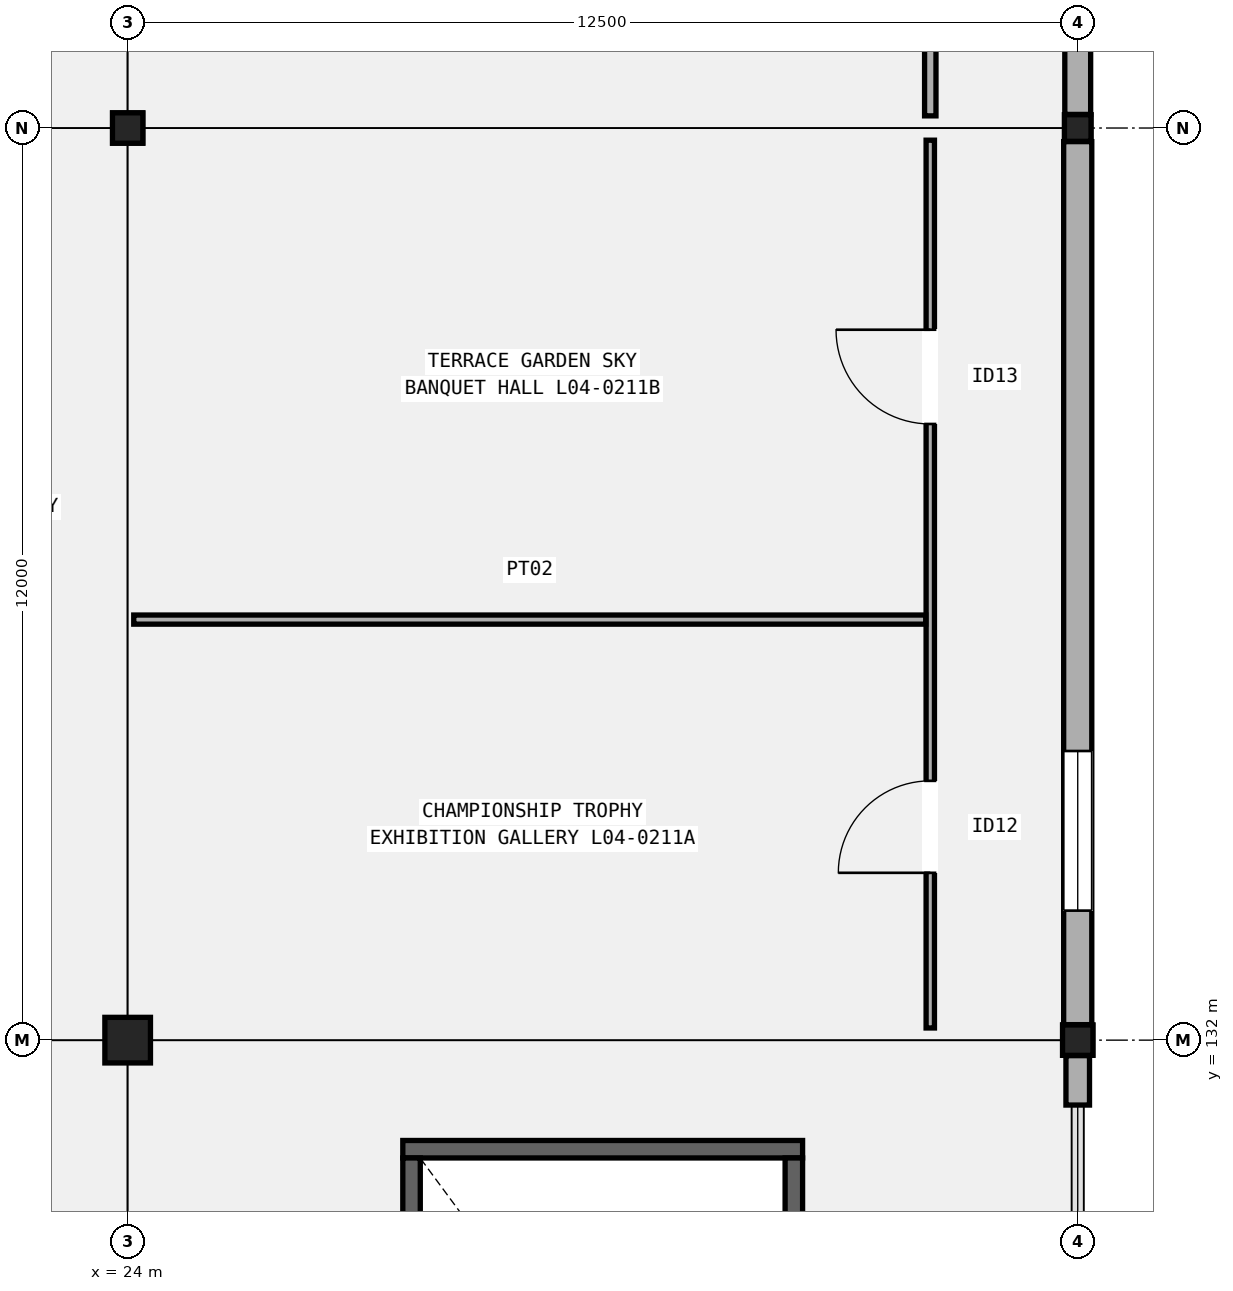
"""IFC4 building model, lengths in metres.
Left out: names, types, materials, properties, quantities, classifications, styles, units other than length and angle.
Written with IfcOpenShell. Run it as: python <this file> out.ifc"""

import sys

from ifc_helpers import new_model, si_unit, direction, frame, frame_2d, origin, origin_2d, place, context, subcontext, project, spatial, rectangle, hollow_rectangle, extrude, element, fill, save


model = new_model("IFC4")
c1 = context("Model", 3, precision=1e-05, world=origin(), true_north=direction((0.0, 1.0)))
c2 = subcontext(c1, "Body", "Model", "MODEL_VIEW")
j1 = project(units=[si_unit("LENGTHUNIT", "METRE"), si_unit("PLANEANGLEUNIT", "RADIAN")], contexts=[c1])
p1 = place(None, origin())
s1 = spatial("IfcSite", under=j1, at=p1, CompositionType="ELEMENT")
p2 = place(p1, origin())
s2 = spatial("IfcBuilding", under=s1, at=p2, CompositionType="ELEMENT")
p3 = place(p2, frame((0.0, 0.0, 20.4)))
s3 = spatial("IfcBuildingStorey", under=s2, at=p3, CompositionType="ELEMENT", Elevation=20.4)
p4 = place(p3, frame((24.0, 132.0, 0.0), z_axis=(0.0, 0.0, 1.0), x_axis=(1.0, 0.0, 0.0)))
e1 = element("IfcColumn", 1, at=p4, inside=s3, PredefinedType="COLUMN", context=c2, shape_type="SweptSolid", body=[
    extrude(rectangle(XDim=0.6, YDim=0.6, at=origin_2d()), origin(), (0.0, 0.0, 1.0), 5.4),
])
for number, where, z_axis, x_axis in (
    (2, (24.0, 144.0, 0.0), (0.0, 0.0, 1.0), (1.0, 0.0, 0.0)),
    (3, (36.5, 132.0, 0.0), (0.0, 0.0, 1.0), (1.0, 0.0, 0.0)),
):
    element("IfcColumn", number, at=place(p3, frame(where, z_axis=z_axis, x_axis=x_axis)), inside=s3, PredefinedType="COLUMN", context=c2, shape_type="SweptSolid", body=[
        extrude(hollow_rectangle(XDim=0.4, YDim=0.4, WallThickness=0.016, InnerFilletRadius=0.016, OuterFilletRadius=0.032, at=origin_2d()), origin(), (0.0, 0.0, 1.0), 5.4),
    ])
p5 = place(p3, frame((36.5, 144.0, 0.0), z_axis=(0.0, 0.0, 1.0), x_axis=(1.0, 0.0, 0.0)))
e4 = element("IfcColumn", 4, at=p5, inside=s3, PredefinedType="COLUMN", context=c2, shape_type="SweptSolid", body=[
    extrude(hollow_rectangle(XDim=0.35, YDim=0.35, WallThickness=0.016, InnerFilletRadius=0.016, OuterFilletRadius=0.032, at=origin_2d()), origin(), (0.0, 0.0, 1.0), 5.4),
])
p6 = place(p3, frame((36.5, 131.146, 0.0), z_axis=(0.0, 0.0, 1.0), x_axis=(0.0, 1.0, 0.0)))
e5 = element("IfcWall", 5, at=p6, inside=s3, PredefinedType="SOLIDWALL", context=c2, shape_type="SweptSolid", body=[
    extrude(rectangle(XDim=0.65, YDim=0.31, at=frame_2d((0.325, 0.0))), origin(), (0.0, 0.0, 1.0), 4.58),
])
p7 = place(p3, frame((36.5, 132.204, 0.0), z_axis=(0.0, 0.0, 1.0), x_axis=(0.0, 1.0, 0.0)))
e6 = element("IfcWall", 6, at=p7, inside=s3, PredefinedType="SOLIDWALL", context=c2, shape_type="SweptSolid", body=[
    extrude(rectangle(XDim=11.617, YDim=0.37, at=frame_2d((5.809, 0.0))), origin(), (0.0, 0.0, 1.0), 4.592),
])
p8 = place(p7, frame((1.5, 0.0, 0.95)))
e7 = element("IfcOpeningElement", 7, at=p8, cuts=e6, PredefinedType="OPENING", context=c2, shape_type="SweptSolid", body=[
    extrude(rectangle(XDim=2.1, YDim=2.25, at=frame_2d((1.05, 1.125))), frame((0.0, 0.195, 0.0), z_axis=(0.0, -1.0, 0.0), x_axis=(1.0, 0.0, 0.0)), (0.0, 0.0, 1.0), 0.39),
])
p9 = place(p3, frame((36.5, 144.179, 0.0), z_axis=(0.0, 0.0, 1.0), x_axis=(0.0, 1.0, 0.0)))
e8 = element("IfcWall", 8, at=p9, inside=s3, PredefinedType="SOLIDWALL", context=c2, shape_type="SweptSolid", body=[
    extrude(rectangle(XDim=11.667, YDim=0.34, at=frame_2d((5.833, 0.0))), origin(), (0.0, 0.0, 1.0), 4.48),
])
p10 = place(p9, frame((1.5, 0.0, 0.95)))
e9 = element("IfcOpeningElement", 9, at=p10, cuts=e8, PredefinedType="OPENING", context=c2, shape_type="SweptSolid", body=[
    extrude(rectangle(XDim=2.1, YDim=2.6, at=frame_2d((1.05, 1.3))), frame((0.0, 0.18, 0.0), z_axis=(0.0, -1.0, 0.0), x_axis=(1.0, 0.0, 0.0)), (0.0, 0.0, 1.0), 0.36),
])
p11 = place(p3, frame((27.62, 130.565, 0.0), z_axis=(0.0, 0.0, 1.0), x_axis=(1.0, 0.0, 0.0)))
e10 = element("IfcWall", 10, at=p11, inside=s3, PredefinedType="SHEAR", context=c2, shape_type="SweptSolid", body=[
    extrude(rectangle(XDim=5.26, YDim=0.23, at=frame_2d((2.63, 0.0))), origin(), (0.0, 0.0, 1.0), 5.18),
])
for number, where, z_axis, x_axis in (
    (11, (27.735, 121.55, 0.0), (0.0, 0.0, 1.0), (0.0, 1.0, 0.0)),
    (12, (32.765, 121.55, 0.0), (0.0, 0.0, 1.0), (0.0, 1.0, 0.0)),
):
    element("IfcWall", number, at=place(p3, frame(where, z_axis=z_axis, x_axis=x_axis)), inside=s3, PredefinedType="SHEAR", context=c2, shape_type="SweptSolid", body=[
        extrude(rectangle(XDim=8.9, YDim=0.23, at=frame_2d((4.45, 0.0))), origin(), (0.0, 0.0, 1.0), 5.18),
    ])
p12 = place(p3, frame((34.56, 132.16, 0.0), z_axis=(0.0, 0.0, 1.0), x_axis=(0.0, 1.0, 0.0)))
e13 = element("IfcWall", 13, at=p12, inside=s3, PredefinedType="PARTITIONING", context=c2, shape_type="SweptSolid", body=[
    extrude(rectangle(XDim=11.68, YDim=0.11, at=frame_2d((5.84, 0.0))), origin(), (0.0, 0.0, 1.0), 4.52),
])
p13 = place(p12, frame((2.042, 0.0, 0.0)))
e14 = element("IfcOpeningElement", 14, at=p13, cuts=e13, PredefinedType="OPENING", context=c2, shape_type="SweptSolid", body=[
    extrude(rectangle(XDim=1.21, YDim=2.18, at=frame_2d((0.605, 1.09))), frame((0.0, 0.065, 0.0), z_axis=(0.0, -1.0, 0.0), x_axis=(1.0, 0.0, 0.0)), (0.0, 0.0, 1.0), 0.13),
])
p14 = place(p12, frame((7.946, 0.0, 0.0)))
e15 = element("IfcOpeningElement", 15, at=p14, cuts=e13, PredefinedType="OPENING", context=c2, shape_type="SweptSolid", body=[
    extrude(rectangle(XDim=1.24, YDim=2.22, at=frame_2d((0.62, 1.11))), frame((0.0, 0.065, 0.0), z_axis=(0.0, -1.0, 0.0), x_axis=(1.0, 0.0, 0.0)), (0.0, 0.0, 1.0), 0.13),
])
p15 = place(p3, frame((24.08, 137.533, 0.0), z_axis=(0.0, 0.0, 1.0), x_axis=(1.0, 0.0, 0.0)))
e16 = element("IfcWall", 16, at=p15, inside=s3, PredefinedType="PARTITIONING", context=c2, shape_type="SweptSolid", body=[
    extrude(rectangle(XDim=10.42, YDim=0.12, at=frame_2d((5.21, 0.0))), origin(), (0.0, 0.0, 1.0), 4.52),
])
p16 = place(p3, frame((34.56, 144.16, 0.0), z_axis=(0.0, 0.0, 1.0), x_axis=(0.0, 1.0, 0.0)))
e17 = element("IfcWall", 17, at=p16, inside=s3, PredefinedType="PARTITIONING", context=c2, shape_type="SweptSolid", body=[
    extrude(rectangle(XDim=11.68, YDim=0.15, at=frame_2d((5.84, 0.0))), origin(), (0.0, 0.0, 1.0), 4.52),
])
p17 = place(p16, frame((5.205, 0.0, 0.0)))
e18 = element("IfcOpeningElement", 18, at=p17, cuts=e17, PredefinedType="OPENING", context=c2, shape_type="SweptSolid", body=[
    extrude(rectangle(XDim=1.27, YDim=2.2, at=frame_2d((0.635, 1.1))), frame((0.0, 0.085, 0.0), z_axis=(0.0, -1.0, 0.0), x_axis=(1.0, 0.0, 0.0)), (0.0, 0.0, 1.0), 0.17),
])
p18 = place(p8, origin())
e19 = element("IfcWindow", 19, at=p18, inside=s3, PartitioningType="SINGLE_PANEL", PredefinedType="WINDOW", context=c2, shape_type="SweptSolid", body=[
    extrude(rectangle(XDim=2.1, YDim=2.25, at=frame_2d((1.05, 1.125))), frame((0.0, 0.03, 0.0), z_axis=(0.0, -1.0, 0.0), x_axis=(1.0, 0.0, 0.0)), (0.0, 0.0, 1.0), 0.06),
])
fill(e7, e19)
p19 = place(p13, origin())
e20 = element("IfcDoor", 20, at=p19, inside=s3, OperationType="SINGLE_SWING_LEFT", PredefinedType="DOOR", context=c2, shape_type="SweptSolid", body=[
    extrude(rectangle(XDim=1.21, YDim=2.18, at=frame_2d((0.605, 1.09))), frame((0.0, 0.025, 0.0), z_axis=(0.0, -1.0, 0.0), x_axis=(1.0, 0.0, 0.0)), (0.0, 0.0, 1.0), 0.05),
])
fill(e14, e20)
p20 = place(p14, origin())
e21 = element("IfcDoor", 21, at=p20, inside=s3, OperationType="SINGLE_SWING_RIGHT", PredefinedType="DOOR", context=c2, shape_type="SweptSolid", body=[
    extrude(rectangle(XDim=1.24, YDim=2.22, at=frame_2d((0.62, 1.11))), frame((0.0, 0.025, 0.0), z_axis=(0.0, -1.0, 0.0), x_axis=(1.0, 0.0, 0.0)), (0.0, 0.0, 1.0), 0.05),
])
fill(e15, e21)
save(model, sys.argv[1])
